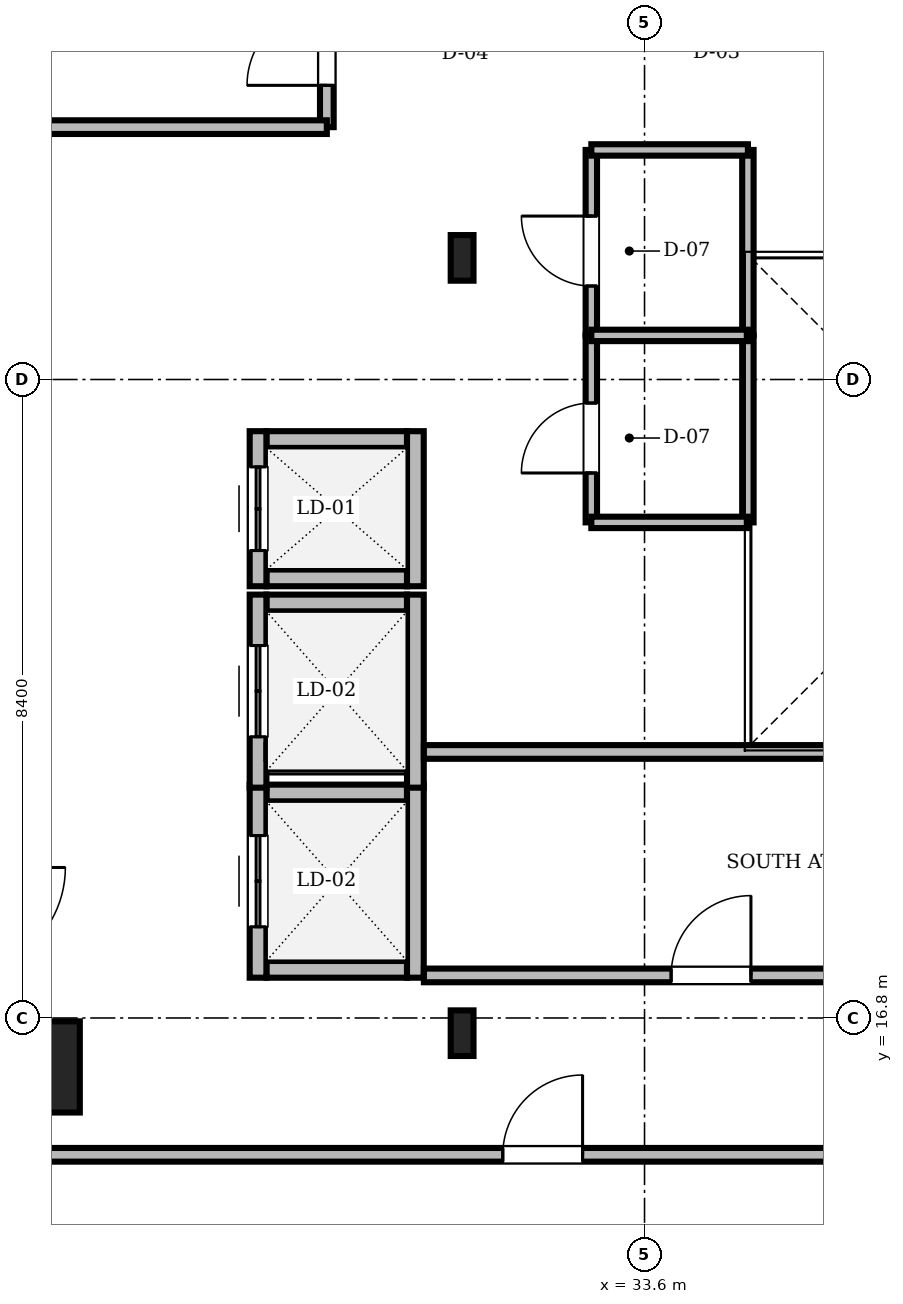
"""IFC4 building model, lengths in metres.
Left out: names, types, materials, properties, quantities, classifications, styles, units other than length and angle.
Written with IfcOpenShell. Run it as: python <this file> out.ifc"""

import sys

from ifc_helpers import new_model, si_unit, direction, frame, frame_2d, origin, origin_2d, place, context, subcontext, project, spatial, rectangle, i_section, extrude, source, transform, mapped, element, fill, save


model = new_model("IFC4")
c1 = context("Model", 3, precision=1e-05, world=origin(), true_north=direction((0.0, 1.0)))
c2 = subcontext(c1, "Body", "Model", "MODEL_VIEW")
j1 = project(units=[si_unit("LENGTHUNIT", "METRE"), si_unit("PLANEANGLEUNIT", "RADIAN")], contexts=[c1])
p1 = place(None, origin())
s1 = spatial("IfcSite", under=j1, at=p1, CompositionType="ELEMENT")
p2 = place(p1, origin())
s2 = spatial("IfcBuilding", under=s1, at=p2, CompositionType="ELEMENT")
p3 = place(p2, frame((0.0, 0.0, 286.15)))
s3 = spatial("IfcBuildingStorey", under=s2, at=p3, CompositionType="ELEMENT", Elevation=286.15)
m1 = source(origin(), c2, "Body", "SweptSolid", [
    extrude(i_section(OverallWidth=0.3, OverallDepth=0.6, WebThickness=0.015, FlangeThickness=0.03, FilletRadius=0.027, at=origin_2d()), origin(), (0.0, 0.0, 1.0), 4.7),
])
for number, where, z_axis, x_axis in (
    (1, (31.2, 16.6, 0.0), (0.0, 0.0, 1.0), (1.0, 0.0, 0.0)),
    (2, (31.2, 26.8, 0.0), (0.0, 0.0, 1.0), (1.0, 0.0, 0.0)),
):
    element("IfcColumn", number, at=place(p3, frame(where, z_axis=z_axis, x_axis=x_axis)), inside=s3, PredefinedType="COLUMN", context=c2, shape_type="MappedRepresentation", body=[
        mapped(m1, transform((0.0, 0.0, 0.0), scale=1.0)),
    ])
m2 = source(origin(), c2, "Body", "SweptSolid", [
    extrude(rectangle(XDim=1.2, YDim=1.2, at=origin_2d()), origin(), (0.0, 0.0, 1.0), 4.738),
])
p4 = place(p3, frame((25.57, 16.156, 0.0), z_axis=(0.113979944671, 0.053949820104, 0.992017131467), x_axis=(-0.427822851259, 0.90386260457, 0.0)))
e3 = element("IfcColumn", 3, at=p4, inside=s3, PredefinedType="COLUMN", context=c2, shape_type="MappedRepresentation", body=[
    mapped(m2, transform((0.0, 0.0, 0.0), scale=1.0)),
])
m3 = source(origin(), c2, "Body", "SweptSolid", [
    extrude(i_section(OverallWidth=0.3, OverallDepth=0.5, WebThickness=0.014, FlangeThickness=0.028, FilletRadius=0.027, at=origin_2d()), origin(), (0.0, 0.0, 1.0), 4.731),
])
for number, where, z_axis, x_axis in (
    (4, (25.57, 28.9, 0.0), (0.114, 0.0, 0.993), (0.0, 1.0, 0.0)),
    (5, (25.57, 21.5, 0.0), (0.114, 0.0, 0.993), (0.0, 1.0, 0.0)),
):
    element("IfcColumn", number, at=place(p3, frame(where, z_axis=z_axis, x_axis=x_axis)), inside=s3, PredefinedType="COLUMN", context=c2, shape_type="MappedRepresentation", body=[
        mapped(m3, transform((0.0, 0.0, 0.0), scale=1.0)),
    ])
m4 = source(origin(), c2, "Body", "SweptSolid", [
    extrude(rectangle(XDim=1.85, YDim=0.22, at=frame_2d((0.925, 0.0))), origin(), (0.0, 0.0, 1.0), 4.7),
])
for number, where, z_axis, x_axis in (
    (6, (28.625, 17.44, 0.0), (0.0, 0.0, 1.0), (1.0, 0.0, 0.0)),
    (7, (28.625, 19.76, 0.0), (0.0, 0.0, 1.0), (1.0, 0.0, 0.0)),
):
    element("IfcWall", number, at=place(p3, frame(where, z_axis=z_axis, x_axis=x_axis)), inside=s3, PredefinedType="SOLIDWALL", context=c2, shape_type="MappedRepresentation", body=[
        mapped(m4, transform((0.0, 0.0, 0.0), scale=1.0)),
    ])
m5 = source(origin(), c2, "Body", "SweptSolid", [
    extrude(rectangle(XDim=2.54, YDim=0.22, at=frame_2d((1.27, 0.0))), origin(), (0.0, 0.0, 1.0), 4.7),
])
p5 = place(p3, frame((28.515, 17.33, 0.0), z_axis=(0.0, 0.0, 1.0), x_axis=(0.0, 1.0, 0.0)))
e8 = element("IfcWall", 8, at=p5, inside=s3, PredefinedType="SOLIDWALL", context=c2, shape_type="MappedRepresentation", body=[
    mapped(m5, transform((0.0, 0.0, 0.0), scale=1.0)),
])
m6 = source(origin(), c2, "Body", "SweptSolid", [
    extrude(rectangle(XDim=1.2, YDim=2.25, at=frame_2d((0.6, 1.125))), frame((0.0, 0.12, 0.0), z_axis=(0.0, -1.0, 0.0), x_axis=(1.0, 0.0, 0.0)), (0.0, 0.0, 1.0), 0.24),
])
p6 = place(p5, frame((0.67, 0.0, 0.0)))
e9 = element("IfcOpeningElement", 9, at=p6, cuts=e8, PredefinedType="OPENING", context=c2, shape_type="MappedRepresentation", body=[
    mapped(m6, transform((0.0, 0.0, 0.0), scale=1.0)),
])
p7 = place(p3, frame((30.585, 17.33, 0.0), z_axis=(0.0, 0.0, 1.0), x_axis=(0.0, 1.0, 0.0)))
e10 = element("IfcWall", 10, at=p7, inside=s3, PredefinedType="SOLIDWALL", context=c2, shape_type="MappedRepresentation", body=[
    mapped(m5, transform((0.0, 0.0, 0.0), scale=1.0)),
])
p8 = place(p3, frame((28.625, 22.26, 0.0), z_axis=(0.0, 0.0, 1.0), x_axis=(1.0, 0.0, 0.0)))
e11 = element("IfcWall", 11, at=p8, inside=s3, PredefinedType="SOLIDWALL", context=c2, shape_type="MappedRepresentation", body=[
    mapped(m4, transform((0.0, 0.0, 0.0), scale=1.0)),
])
p9 = place(p3, frame((28.515, 19.83, 0.0), z_axis=(0.0, 0.0, 1.0), x_axis=(0.0, 1.0, 0.0)))
e12 = element("IfcWall", 12, at=p9, inside=s3, PredefinedType="SOLIDWALL", context=c2, shape_type="MappedRepresentation", body=[
    mapped(m5, transform((0.0, 0.0, 0.0), scale=1.0)),
])
p10 = place(p9, frame((0.67, 0.0, 0.0)))
e13 = element("IfcOpeningElement", 13, at=p10, cuts=e12, PredefinedType="OPENING", context=c2, shape_type="MappedRepresentation", body=[
    mapped(m6, transform((0.0, 0.0, 0.0), scale=1.0)),
])
p11 = place(p3, frame((30.585, 19.83, 0.0), z_axis=(0.0, 0.0, 1.0), x_axis=(0.0, 1.0, 0.0)))
e14 = element("IfcWall", 14, at=p11, inside=s3, PredefinedType="SOLIDWALL", context=c2, shape_type="MappedRepresentation", body=[
    mapped(m5, transform((0.0, 0.0, 0.0), scale=1.0)),
])
for number, where, z_axis, x_axis in (
    (15, (28.625, 22.59, 0.0), (0.0, 0.0, 1.0), (1.0, 0.0, 0.0)),
    (16, (28.625, 24.41, 0.0), (0.0, 0.0, 1.0), (1.0, 0.0, 0.0)),
):
    element("IfcWall", number, at=place(p3, frame(where, z_axis=z_axis, x_axis=x_axis)), inside=s3, PredefinedType="SOLIDWALL", context=c2, shape_type="MappedRepresentation", body=[
        mapped(m4, transform((0.0, 0.0, 0.0), scale=1.0)),
    ])
m7 = source(origin(), c2, "Body", "SweptSolid", [
    extrude(rectangle(XDim=2.04, YDim=0.22, at=frame_2d((1.02, 0.0))), origin(), (0.0, 0.0, 1.0), 4.7),
])
p12 = place(p3, frame((28.515, 22.48, 0.0), z_axis=(0.0, 0.0, 1.0), x_axis=(0.0, 1.0, 0.0)))
e17 = element("IfcWall", 17, at=p12, inside=s3, PredefinedType="SOLIDWALL", context=c2, shape_type="MappedRepresentation", body=[
    mapped(m7, transform((0.0, 0.0, 0.0), scale=1.0)),
])
m8 = source(origin(), c2, "Body", "SweptSolid", [
    extrude(rectangle(XDim=1.1, YDim=2.2, at=frame_2d((0.55, 1.1))), frame((0.0, 0.12, 0.0), z_axis=(0.0, -1.0, 0.0), x_axis=(1.0, 0.0, 0.0)), (0.0, 0.0, 1.0), 0.24),
])
p13 = place(p12, frame((0.47, 0.0, 0.0)))
e18 = element("IfcOpeningElement", 18, at=p13, cuts=e17, PredefinedType="OPENING", context=c2, shape_type="MappedRepresentation", body=[
    mapped(m8, transform((0.0, 0.0, 0.0), scale=1.0)),
])
p14 = place(p3, frame((30.585, 22.48, 0.0), z_axis=(0.0, 0.0, 1.0), x_axis=(0.0, 1.0, 0.0)))
e19 = element("IfcWall", 19, at=p14, inside=s3, PredefinedType="SOLIDWALL", context=c2, shape_type="MappedRepresentation", body=[
    mapped(m7, transform((0.0, 0.0, 0.0), scale=1.0)),
])
m9 = source(origin(), c2, "Body", "SweptSolid", [
    extrude(rectangle(XDim=25.558, YDim=0.18, at=frame_2d((12.779, 0.0))), origin(), (0.0, 0.0, 1.0), 3.942),
])
p15 = place(p3, frame((24.742, 15.0, 0.0), z_axis=(0.0, 0.0, 1.0), x_axis=(1.0, 0.0, 0.0)))
e20 = element("IfcWall", 20, at=p15, inside=s3, PredefinedType="PARTITIONING", context=c2, shape_type="MappedRepresentation", body=[
    mapped(m9, transform((0.0, 0.0, 0.0), scale=1.0)),
])
m10 = source(origin(), c2, "Body", "SweptSolid", [
    extrude(rectangle(XDim=1.05, YDim=2.2, at=frame_2d((0.525, 1.1))), frame((0.0, 0.1, 0.0), z_axis=(0.0, -1.0, 0.0), x_axis=(1.0, 0.0, 0.0)), (0.0, 0.0, 1.0), 0.2),
])
p16 = place(p15, frame((6.993, 0.0, 0.0)))
e21 = element("IfcOpeningElement", 21, at=p16, cuts=e20, PredefinedType="OPENING", context=c2, shape_type="MappedRepresentation", body=[
    mapped(m10, transform((0.0, 0.0, 0.0), scale=1.0)),
])
p17 = place(p15, frame((18.238, 0.0, 0.0)))
e22 = element("IfcOpeningElement", 22, at=p17, cuts=e20, PredefinedType="OPENING", context=c2, shape_type="MappedRepresentation", body=[
    mapped(m10, transform((0.0, 0.0, 0.0), scale=1.0)),
])
p18 = place(p15, frame((24.308, 0.0, 0.0)))
e23 = element("IfcOpeningElement", 23, at=p18, cuts=e20, PredefinedType="OPENING", context=c2, shape_type="MappedRepresentation", body=[
    mapped(m10, transform((0.0, 0.0, 0.0), scale=1.0)),
])
m11 = source(origin(), c2, "Body", "SweptSolid", [
    extrude(rectangle(XDim=2.13, YDim=0.18, at=frame_2d((1.065, 0.0))), origin(), (0.0, 0.0, 1.0), 4.332),
])
p19 = place(p3, frame((29.42, 28.52, 0.0), z_axis=(0.0, 0.0, 1.0), x_axis=(0.0, 1.0, 0.0)))
e24 = element("IfcWall", 24, at=p19, inside=s3, PredefinedType="PARTITIONING", context=c2, shape_type="MappedRepresentation", body=[
    mapped(m11, transform((0.0, 0.0, 0.0), scale=1.0)),
])
p20 = place(p19, frame((0.55, 0.0, 0.0)))
e25 = element("IfcOpeningElement", 25, at=p20, cuts=e24, PredefinedType="OPENING", context=c2, shape_type="MappedRepresentation", body=[
    mapped(m10, transform((0.0, 0.0, 0.0), scale=1.0)),
])
m12 = source(origin(), c2, "Body", "SweptSolid", [
    extrude(rectangle(XDim=10.803, YDim=0.18, at=frame_2d((5.401, 0.0))), origin(), (0.0, 0.0, 1.0), 4.242),
])
p21 = place(p3, frame((30.697, 17.36, 0.0), z_axis=(0.0, 0.0, 1.0), x_axis=(1.0, 0.0, 0.0)))
e26 = element("IfcWall", 26, at=p21, inside=s3, PredefinedType="PARTITIONING", context=c2, shape_type="MappedRepresentation", body=[
    mapped(m12, transform((0.0, 0.0, 0.0), scale=1.0)),
])
p22 = place(p21, frame((3.253, 0.0, 0.0)))
e27 = element("IfcOpeningElement", 27, at=p22, cuts=e26, PredefinedType="OPENING", context=c2, shape_type="MappedRepresentation", body=[
    mapped(m10, transform((0.0, 0.0, 0.0), scale=1.0)),
])
m13 = source(origin(), c2, "Body", "SweptSolid", [
    extrude(rectangle(XDim=2.46, YDim=0.15, at=frame_2d((1.23, 0.0))), origin(), (0.0, 0.0, 1.0), 4.7),
])
p23 = place(p3, frame((32.9, 23.32, 0.0), z_axis=(0.0, 0.0, 1.0), x_axis=(0.0, 1.0, 0.0)))
e28 = element("IfcWall", 28, at=p23, inside=s3, PredefinedType="PARTITIONING", context=c2, shape_type="MappedRepresentation", body=[
    mapped(m13, transform((0.0, 0.0, 0.0), scale=1.0)),
])
m14 = source(origin(), c2, "Body", "SweptSolid", [
    extrude(rectangle(XDim=0.92, YDim=2.1, at=frame_2d((0.46, 1.05))), frame((0.0, 0.085, 0.0), z_axis=(0.0, -1.0, 0.0), x_axis=(1.0, 0.0, 0.0)), (0.0, 0.0, 1.0), 0.17),
])
p24 = place(p23, frame((0.65, 0.0, 0.0)))
e29 = element("IfcOpeningElement", 29, at=p24, cuts=e28, PredefinedType="OPENING", context=c2, shape_type="MappedRepresentation", body=[
    mapped(m14, transform((0.0, 0.0, 0.0), scale=1.0)),
])
m15 = source(origin(), c2, "Body", "SweptSolid", [
    extrude(rectangle(XDim=2.44, YDim=0.15, at=frame_2d((1.22, 0.0))), origin(), (0.0, 0.0, 1.0), 4.242),
])
p25 = place(p3, frame((32.9, 25.78, 0.0), z_axis=(0.0, 0.0, 1.0), x_axis=(0.0, 1.0, 0.0)))
e30 = element("IfcWall", 30, at=p25, inside=s3, PredefinedType="PARTITIONING", context=c2, shape_type="MappedRepresentation", body=[
    mapped(m15, transform((0.0, 0.0, 0.0), scale=1.0)),
])
p26 = place(p25, frame((0.65, 0.0, 0.0)))
e31 = element("IfcOpeningElement", 31, at=p26, cuts=e30, PredefinedType="OPENING", context=c2, shape_type="MappedRepresentation", body=[
    mapped(m14, transform((0.0, 0.0, 0.0), scale=1.0)),
])
m16 = source(origin(), c2, "Body", "SweptSolid", [
    extrude(rectangle(XDim=1.846, YDim=0.18, at=frame_2d((0.923, 0.0))), origin(), (0.0, 0.0, 1.0), 4.7),
])
p27 = place(p3, frame((28.627, 20.3, 0.0), z_axis=(0.0, 0.0, 1.0), x_axis=(1.0, 0.0, 0.0)))
e32 = element("IfcWall", 32, at=p27, inside=s3, PredefinedType="PARTITIONING", context=c2, shape_type="MappedRepresentation", body=[
    mapped(m16, transform((0.0, 0.0, 0.0), scale=1.0)),
])
p28 = place(p3, frame((30.697, 20.3, 0.0), z_axis=(0.0, 0.0, 1.0), x_axis=(1.0, 0.0, 0.0)))
e33 = element("IfcWall", 33, at=p28, inside=s3, PredefinedType="PARTITIONING", context=c2, shape_type="MappedRepresentation", body=[
    mapped(m12, transform((0.0, 0.0, 0.0), scale=1.0)),
])
m17 = source(origin(), c2, "Body", "SweptSolid", [
    extrude(rectangle(XDim=4.678, YDim=0.18, at=frame_2d((2.339, 0.0))), origin(), (0.0, 0.0, 1.0), 3.942),
])
p29 = place(p3, frame((24.742, 28.52, 0.0), z_axis=(0.0, 0.0, 1.0), x_axis=(1.0, 0.0, 0.0)))
e34 = element("IfcWall", 34, at=p29, inside=s3, PredefinedType="PARTITIONING", context=c2, shape_type="MappedRepresentation", body=[
    mapped(m17, transform((0.0, 0.0, 0.0), scale=1.0)),
])
p30 = place(p3, frame((34.96, 23.32, 0.0), z_axis=(0.0, 0.0, 1.0), x_axis=(0.0, 1.0, 0.0)))
e35 = element("IfcWall", 35, at=p30, inside=s3, PredefinedType="PARTITIONING", context=c2, shape_type="MappedRepresentation", body=[
    mapped(m13, transform((0.0, 0.0, 0.0), scale=1.0)),
])
p31 = place(p3, frame((34.96, 25.78, 0.0), z_axis=(0.0, 0.0, 1.0), x_axis=(0.0, 1.0, 0.0)))
e36 = element("IfcWall", 36, at=p31, inside=s3, PredefinedType="PARTITIONING", context=c2, shape_type="MappedRepresentation", body=[
    mapped(m15, transform((0.0, 0.0, 0.0), scale=1.0)),
])
m18 = source(origin(), c2, "Body", "SweptSolid", [
    extrude(rectangle(XDim=2.06, YDim=0.15, at=frame_2d((1.03, 0.0))), origin(), (0.0, 0.0, 1.0), 4.7),
])
p32 = place(p3, frame((32.9, 25.78, 0.0), z_axis=(0.0, 0.0, 1.0), x_axis=(1.0, 0.0, 0.0)))
e37 = element("IfcWall", 37, at=p32, inside=s3, PredefinedType="PARTITIONING", context=c2, shape_type="MappedRepresentation", body=[
    mapped(m18, transform((0.0, 0.0, 0.0), scale=1.0)),
])
m19 = source(origin(), c2, "Body", "SweptSolid", [
    extrude(rectangle(XDim=2.06, YDim=0.15, at=frame_2d((1.03, 0.0))), origin(), (0.0, 0.0, 1.0), 4.332),
])
p33 = place(p3, frame((32.9, 28.22, 0.0), z_axis=(0.0, 0.0, 1.0), x_axis=(1.0, 0.0, 0.0)))
e38 = element("IfcWall", 38, at=p33, inside=s3, PredefinedType="PARTITIONING", context=c2, shape_type="MappedRepresentation", body=[
    mapped(m19, transform((0.0, 0.0, 0.0), scale=1.0)),
])
p34 = place(p3, frame((32.9, 23.32, 0.0), z_axis=(0.0, 0.0, 1.0), x_axis=(1.0, 0.0, 0.0)))
e39 = element("IfcWall", 39, at=p34, inside=s3, PredefinedType="PARTITIONING", context=c2, shape_type="MappedRepresentation", body=[
    mapped(m18, transform((0.0, 0.0, 0.0), scale=1.0)),
])
m20 = source(origin(), c2, "Body", "SweptSolid", [
    extrude(rectangle(XDim=1.2, YDim=2.25, at=frame_2d((0.6, 1.125))), frame((0.0, 0.025, 0.0), z_axis=(0.0, -1.0, 0.0), x_axis=(1.0, 0.0, 0.0)), (0.0, 0.0, 1.0), 0.05),
])
p35 = place(p6, origin())
e40 = element("IfcDoor", 40, at=p35, inside=s3, OperationType="DOUBLE_DOOR_SLIDING", PredefinedType="DOOR", context=c2, shape_type="MappedRepresentation", body=[
    mapped(m20, transform((0.0, 0.0, 0.0), scale=1.0)),
])
fill(e9, e40)
p36 = place(p10, origin())
e41 = element("IfcDoor", 41, at=p36, inside=s3, OperationType="DOUBLE_DOOR_SLIDING", PredefinedType="DOOR", context=c2, shape_type="MappedRepresentation", body=[
    mapped(m20, transform((0.0, 0.0, 0.0), scale=1.0)),
])
fill(e13, e41)
m21 = source(origin(), c2, "Body", "SweptSolid", [
    extrude(rectangle(XDim=1.1, YDim=2.2, at=frame_2d((0.55, 1.1))), frame((0.0, 0.025, 0.0), z_axis=(0.0, -1.0, 0.0), x_axis=(1.0, 0.0, 0.0)), (0.0, 0.0, 1.0), 0.05),
])
p37 = place(p13, origin())
e42 = element("IfcDoor", 42, at=p37, inside=s3, OperationType="DOUBLE_DOOR_SLIDING", PredefinedType="DOOR", context=c2, shape_type="MappedRepresentation", body=[
    mapped(m21, transform((0.0, 0.0, 0.0), scale=1.0)),
])
fill(e18, e42)
m22 = source(origin(), c2, "Body", "SweptSolid", [
    extrude(rectangle(XDim=1.05, YDim=2.2, at=frame_2d((0.525, 1.1))), frame((0.0, 0.025, 0.0), z_axis=(0.0, -1.0, 0.0), x_axis=(1.0, 0.0, 0.0)), (0.0, 0.0, 1.0), 0.05),
])
p38 = place(p16, origin())
e43 = element("IfcDoor", 43, at=p38, inside=s3, OperationType="SINGLE_SWING_RIGHT", PredefinedType="DOOR", context=c2, shape_type="MappedRepresentation", body=[
    mapped(m22, transform((0.0, 0.0, 0.0), scale=1.0)),
])
fill(e21, e43)
p39 = place(p20, origin())
e44 = element("IfcDoor", 44, at=p39, inside=s3, OperationType="SINGLE_SWING_LEFT", PredefinedType="DOOR", context=c2, shape_type="MappedRepresentation", body=[
    mapped(m22, transform((0.0, 0.0, 0.0), scale=1.0)),
])
fill(e25, e44)
p40 = place(p22, origin())
e45 = element("IfcDoor", 45, at=p40, inside=s3, OperationType="SINGLE_SWING_RIGHT", PredefinedType="DOOR", context=c2, shape_type="MappedRepresentation", body=[
    mapped(m22, transform((0.0, 0.0, 0.0), scale=1.0)),
])
fill(e27, e45)
m23 = source(origin(), c2, "Body", "SweptSolid", [
    extrude(rectangle(XDim=0.92, YDim=2.1, at=frame_2d((0.46, 1.05))), frame((0.0, 0.025, 0.0), z_axis=(0.0, -1.0, 0.0), x_axis=(1.0, 0.0, 0.0)), (0.0, 0.0, 1.0), 0.05),
])
p41 = place(p24, origin())
e46 = element("IfcDoor", 46, at=p41, inside=s3, OperationType="SINGLE_SWING_LEFT", PredefinedType="DOOR", context=c2, shape_type="MappedRepresentation", body=[
    mapped(m23, transform((0.0, 0.0, 0.0), scale=1.0)),
])
fill(e29, e46)
p42 = place(p26, origin())
e47 = element("IfcDoor", 47, at=p42, inside=s3, OperationType="SINGLE_SWING_RIGHT", PredefinedType="DOOR", context=c2, shape_type="MappedRepresentation", body=[
    mapped(m23, transform((0.0, 0.0, 0.0), scale=1.0)),
])
fill(e31, e47)
save(model, sys.argv[1])
